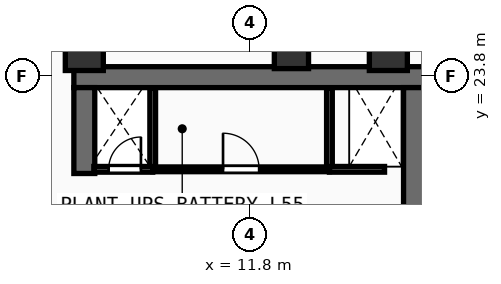
"""IFC4 building model, lengths in metres.
Left out: names, types, materials, properties, quantities, classifications, styles, units other than length and angle.
Written with IfcOpenShell. Run it as: python <this file> out.ifc"""

import sys

from ifc_helpers import new_model, si_unit, direction, frame, frame_2d, origin, origin_2d, place, context, subcontext, project, spatial, rectangle, extrude, element, fill, save


model = new_model("IFC4")
c1 = context("Model", 3, precision=1e-05, world=origin(), true_north=direction((0.0, 1.0)))
c2 = subcontext(c1, "Body", "Model", "MODEL_VIEW")
j1 = project(units=[si_unit("LENGTHUNIT", "METRE"), si_unit("PLANEANGLEUNIT", "RADIAN")], contexts=[c1])
p1 = place(None, origin())
s1 = spatial("IfcSite", under=j1, at=p1, CompositionType="ELEMENT")
p2 = place(p1, origin())
s2 = spatial("IfcBuilding", under=s1, at=p2, CompositionType="ELEMENT")
p3 = place(p2, frame((0.0, 0.0, 215.9)))
s3 = spatial("IfcBuildingStorey", under=s2, at=p3, CompositionType="ELEMENT", Elevation=215.9)
p4 = place(p3, frame((7.175, 23.775, 0.0), z_axis=(0.0, 0.0, 1.0), x_axis=(1.0, 0.0, 0.0)))
e1 = element("IfcWall", 1, at=p4, inside=s3, PredefinedType="SHEAR", context=c2, shape_type="SweptSolid", body=[
    extrude(rectangle(XDim=13.9, YDim=0.55, at=frame_2d((6.95, 0.0))), origin(), (0.0, 0.0, 1.0), 3.56),
])
p5 = place(p3, frame((7.45, 21.24, 0.0), z_axis=(0.0, 0.0, 1.0), x_axis=(0.0, 1.0, 0.0)))
e2 = element("IfcWall", 2, at=p5, inside=s3, PredefinedType="SHEAR", context=c2, shape_type="SweptSolid", body=[
    extrude(rectangle(XDim=2.26, YDim=0.55, at=frame_2d((1.13, 0.0))), origin(), (0.0, 0.0, 1.0), 3.56),
])
p6 = place(p3, frame((16.125, 14.4, 0.0), z_axis=(0.0, 0.0, 1.0), x_axis=(0.0, 1.0, 0.0)))
e3 = element("IfcWall", 3, at=p6, inside=s3, PredefinedType="SHEAR", context=c2, shape_type="SweptSolid", body=[
    extrude(rectangle(XDim=9.1, YDim=0.55, at=frame_2d((4.55, 0.0))), origin(), (0.0, 0.0, 1.0), 3.56),
])
for number, where, z_axis, x_axis in (
    (4, (7.45, 24.45, 0.0), (0.0, 0.0, 1.0), (1.0, 0.0, 0.0)),
    (5, (15.45, 24.45, 0.0), (0.0, 0.0, 1.0), (1.0, 0.0, 0.0)),
):
    element("IfcColumn", number, at=place(p3, frame(where, z_axis=z_axis, x_axis=x_axis)), inside=s3, PredefinedType="COLUMN", context=c2, shape_type="SweptSolid", body=[
        extrude(rectangle(XDim=1.0, YDim=1.0, at=origin_2d()), origin(), (0.0, 0.0, 1.0), 3.56),
    ])
p7 = place(p3, frame((12.9, 24.45, 0.0), z_axis=(0.0, 0.0, 1.0), x_axis=(1.0, 0.0, 0.0)))
e6 = element("IfcColumn", 6, at=p7, inside=s3, PredefinedType="COLUMN", context=c2, shape_type="SweptSolid", body=[
    extrude(rectangle(XDim=0.9, YDim=0.9, at=origin_2d()), origin(), (0.0, 0.0, 1.0), 3.56),
])
for number, where, z_axis, x_axis in (
    (7, (9.25, 21.35, 0.0), (0.0, 0.0, 1.0), (0.0, 1.0, 0.0)),
    (8, (13.9, 21.35, 0.0), (0.0, 0.0, 1.0), (0.0, 1.0, 0.0)),
):
    element("IfcWall", number, at=place(p3, frame(where, z_axis=z_axis, x_axis=x_axis)), inside=s3, PredefinedType="PARTITIONING", context=c2, shape_type="SweptSolid", body=[
        extrude(rectangle(XDim=2.13, YDim=0.15, at=frame_2d((1.065, 0.0))), origin(), (0.0, 0.0, 1.0), 3.56),
    ])
p8 = place(p3, frame((7.7, 21.35, 0.0), z_axis=(0.0, 0.0, 1.0), x_axis=(1.0, 0.0, 0.0)))
e9 = element("IfcWall", 9, at=p8, inside=s3, PredefinedType="PARTITIONING", context=c2, shape_type="SweptSolid", body=[
    extrude(rectangle(XDim=1.55, YDim=0.15, at=frame_2d((0.775, 0.0))), origin(), (0.0, 0.0, 1.0), 3.56),
])
p9 = place(p8, frame((0.39, 0.0, 0.0)))
e10 = element("IfcOpeningElement", 10, at=p9, cuts=e9, PredefinedType="OPENING", context=c2, shape_type="SweptSolid", body=[
    extrude(rectangle(XDim=0.85, YDim=2.15, at=frame_2d((0.425, 1.075))), frame((0.0, 0.085, 0.0), z_axis=(0.0, -1.0, 0.0), x_axis=(1.0, 0.0, 0.0)), (0.0, 0.0, 1.0), 0.17),
])
p10 = place(p3, frame((13.9, 21.35, 0.0), z_axis=(0.0, 0.0, 1.0), x_axis=(1.0, 0.0, 0.0)))
e11 = element("IfcWall", 11, at=p10, inside=s3, PredefinedType="PARTITIONING", context=c2, shape_type="SweptSolid", body=[
    extrude(rectangle(XDim=1.45, YDim=0.15, at=frame_2d((0.725, 0.0))), origin(), (0.0, 0.0, 1.0), 3.56),
])
p11 = place(p3, frame((9.25, 21.35, 0.0), z_axis=(0.0, 0.0, 1.0), x_axis=(1.0, 0.0, 0.0)))
e12 = element("IfcWall", 12, at=p11, inside=s3, PredefinedType="PARTITIONING", context=c2, shape_type="SweptSolid", body=[
    extrude(rectangle(XDim=4.65, YDim=0.125, at=frame_2d((2.325, 0.0))), origin(), (0.0, 0.0, 1.0), 3.56),
])
p12 = place(p11, frame((1.85, 0.0, 0.0)))
e13 = element("IfcOpeningElement", 13, at=p12, cuts=e12, PredefinedType="OPENING", context=c2, shape_type="SweptSolid", body=[
    extrude(rectangle(XDim=0.95, YDim=2.15, at=frame_2d((0.475, 1.075))), frame((0.0, 0.073, 0.0), z_axis=(0.0, -1.0, 0.0), x_axis=(1.0, 0.0, 0.0)), (0.0, 0.0, 1.0), 0.145),
])
p13 = place(p9, origin())
e14 = element("IfcDoor", 14, at=p13, inside=s3, OperationType="SINGLE_SWING_RIGHT", PredefinedType="DOOR", context=c2, shape_type="SweptSolid", body=[
    extrude(rectangle(XDim=0.85, YDim=2.15, at=frame_2d((0.425, 1.075))), frame((0.0, 0.025, 0.0), z_axis=(0.0, -1.0, 0.0), x_axis=(1.0, 0.0, 0.0)), (0.0, 0.0, 1.0), 0.05),
])
fill(e10, e14)
p14 = place(p12, origin())
e15 = element("IfcDoor", 15, at=p14, inside=s3, OperationType="SINGLE_SWING_LEFT", PredefinedType="DOOR", context=c2, shape_type="SweptSolid", body=[
    extrude(rectangle(XDim=0.95, YDim=2.15, at=frame_2d((0.475, 1.075))), frame((0.0, 0.025, 0.0), z_axis=(0.0, -1.0, 0.0), x_axis=(1.0, 0.0, 0.0)), (0.0, 0.0, 1.0), 0.05),
])
fill(e13, e15)
save(model, sys.argv[1])
